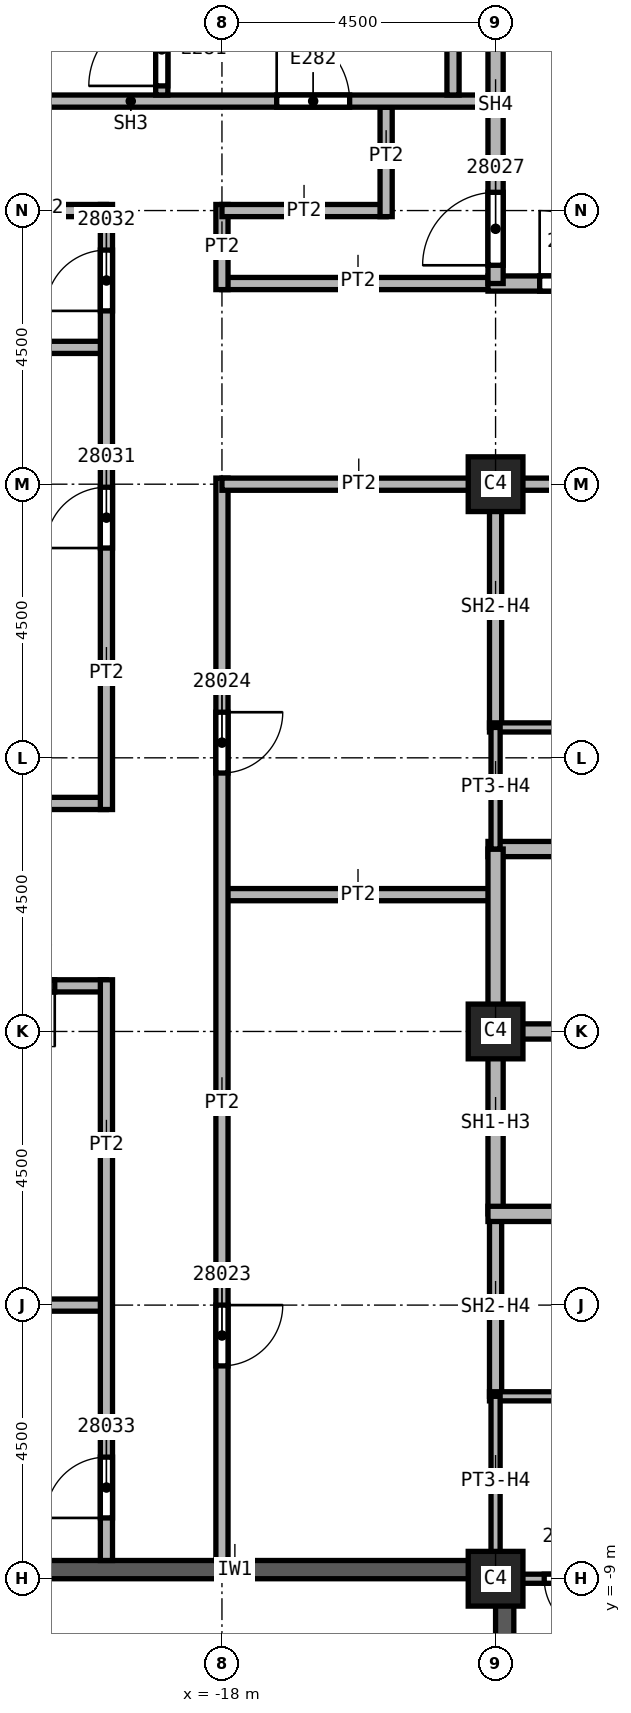
"""IFC4 building model, lengths in metres.
Left out: names, types, materials, properties, quantities, classifications, styles, units other than length and angle.
Written with IfcOpenShell. Run it as: python <this file> out.ifc"""

import sys

from ifc_helpers import new_model, si_unit, direction, frame, frame_2d, origin, origin_2d, place, context, subcontext, project, spatial, rectangle, extrude, element, fill, save


model = new_model("IFC4")
c1 = context("Model", 3, precision=1e-05, world=origin(), true_north=direction((0.0, 1.0)))
c2 = subcontext(c1, "Body", "Model", "MODEL_VIEW")
j1 = project(units=[si_unit("LENGTHUNIT", "METRE"), si_unit("PLANEANGLEUNIT", "RADIAN")], contexts=[c1])
p1 = place(None, origin())
s1 = spatial("IfcSite", under=j1, at=p1, CompositionType="ELEMENT")
p2 = place(p1, origin())
s2 = spatial("IfcBuilding", under=s1, at=p2, CompositionType="ELEMENT")
p3 = place(p2, frame((0.0, 0.0, 236.0)))
s3 = spatial("IfcBuildingStorey", under=s2, at=p3, CompositionType="ELEMENT", Elevation=236.0)
for number, where, z_axis, x_axis in (
    (1, (-13.5, 0.0, 0.0), (0.0, 0.0, 1.0), (1.0, 0.0, 0.0)),
    (2, (-13.5, 9.0, 0.0), (0.0, 0.0, 1.0), (1.0, 0.0, 0.0)),
    (3, (-13.5, -9.0, 0.0), (0.0, 0.0, 1.0), (1.0, 0.0, 0.0)),
):
    element("IfcColumn", number, at=place(p3, frame(where, z_axis=z_axis, x_axis=x_axis)), inside=s3, PredefinedType="COLUMN", context=c2, shape_type="SweptSolid", body=[
        extrude(rectangle(XDim=0.9, YDim=0.9, at=origin_2d()), origin(), (0.0, 0.0, 1.0), 5.72),
    ])
p4 = place(p3, frame((-13.35, -17.5, 0.0), z_axis=(0.0, 0.0, 1.0), x_axis=(0.0, 1.0, 0.0)))
e4 = element("IfcWall", 4, at=p4, inside=s3, PredefinedType="SOLIDWALL", context=c2, shape_type="SweptSolid", body=[
    extrude(rectangle(XDim=8.475, YDim=0.3, at=frame_2d((4.238, 0.0))), origin(), (0.0, 0.0, 1.0), 5.12),
])
p5 = place(p4, frame((3.425, 0.0, 0.0)))
e5 = element("IfcOpeningElement", 5, at=p5, cuts=e4, PredefinedType="OPENING", context=c2, shape_type="SweptSolid", body=[
    extrude(rectangle(XDim=1.2, YDim=2.4, at=frame_2d((0.6, 1.2))), frame((0.0, 0.15, 0.0), z_axis=(0.0, -1.0, 0.0), x_axis=(1.0, 0.0, 0.0)), (0.0, 0.0, 1.0), 0.3),
])
p6 = place(p3, frame((-22.0, -8.85, 0.0), z_axis=(0.0, 0.0, 1.0), x_axis=(1.0, 0.0, 0.0)))
e6 = element("IfcWall", 6, at=p6, inside=s3, PredefinedType="SOLIDWALL", context=c2, shape_type="SweptSolid", body=[
    extrude(rectangle(XDim=8.475, YDim=0.3, at=frame_2d((4.238, 0.0))), origin(), (0.0, 0.0, 1.0), 5.12),
])
p7 = place(p3, frame((-33.85, 3.75, 0.0), z_axis=(0.0, 0.0, 1.0), x_axis=(1.0, 0.0, 0.0)))
e7 = element("IfcWall", 7, at=p7, inside=s3, PredefinedType="PARTITIONING", context=c2, shape_type="SweptSolid", body=[
    extrude(rectangle(XDim=13.95, YDim=0.2, at=frame_2d((6.975, 0.0))), origin(), (0.0, 0.0, 1.0), 5.72),
])
for number, where, z_axis, x_axis in (
    (8, (-27.1, -4.5, 0.0), (0.0, 0.0, 1.0), (1.0, 0.0, 0.0)),
    (9, (-27.1, 11.25, 0.0), (0.0, 0.0, 1.0), (1.0, 0.0, 0.0)),
):
    element("IfcWall", number, at=place(p3, frame(where, z_axis=z_axis, x_axis=x_axis)), inside=s3, PredefinedType="PARTITIONING", context=c2, shape_type="SweptSolid", body=[
        extrude(rectangle(XDim=7.2, YDim=0.2, at=frame_2d((3.6, 0.0))), origin(), (0.0, 0.0, 1.0), 5.72),
    ])
p8 = place(p3, frame((-19.9, 0.75, 0.0), z_axis=(0.0, 0.0, 1.0), x_axis=(-1.0, 0.0, 0.0)))
e10 = element("IfcWall", 10, at=p8, inside=s3, PredefinedType="PARTITIONING", context=c2, shape_type="SweptSolid", body=[
    extrude(rectangle(XDim=13.95, YDim=0.2, at=frame_2d((6.975, 0.0))), origin(), (0.0, 0.0, 1.0), 5.72),
])
p9 = place(p8, frame((0.85, 0.0, 0.0)))
e11 = element("IfcOpeningElement", 11, at=p9, cuts=e10, PredefinedType="OPENING", context=c2, shape_type="SweptSolid", body=[
    extrude(rectangle(XDim=1.0, YDim=2.1, at=frame_2d((0.5, 1.05))), frame((0.0, 0.1, 0.0), z_axis=(0.0, -1.0, 0.0), x_axis=(1.0, 0.0, 0.0)), (0.0, 0.0, 1.0), 0.2),
])
p10 = place(p3, frame((-19.9, -8.7, 0.0), z_axis=(0.0, 0.0, 1.0), x_axis=(0.0, 1.0, 0.0)))
e12 = element("IfcWall", 12, at=p10, inside=s3, PredefinedType="PARTITIONING", context=c2, shape_type="SweptSolid", body=[
    extrude(rectangle(XDim=9.55, YDim=0.2, at=frame_2d((4.775, 0.0))), origin(), (0.0, 0.0, 1.0), 5.72),
])
p11 = place(p10, frame((0.7, 0.0, 0.0)))
e13 = element("IfcOpeningElement", 13, at=p11, cuts=e12, PredefinedType="OPENING", context=c2, shape_type="SweptSolid", body=[
    extrude(rectangle(XDim=1.0, YDim=2.1, at=frame_2d((0.5, 1.05))), frame((0.0, 0.1, 0.0), z_axis=(0.0, -1.0, 0.0), x_axis=(1.0, 0.0, 0.0)), (0.0, 0.0, 1.0), 0.2),
])
p12 = place(p3, frame((-19.9, 3.65, 0.0), z_axis=(0.0, 0.0, 1.0), x_axis=(0.0, 1.0, 0.0)))
e14 = element("IfcWall", 14, at=p12, inside=s3, PredefinedType="PARTITIONING", context=c2, shape_type="SweptSolid", body=[
    extrude(rectangle(XDim=9.95, YDim=0.2, at=frame_2d((4.975, 0.0))), origin(), (0.0, 0.0, 1.0), 5.72),
])
p13 = place(p12, frame((4.3, 0.0, 0.0)))
e15 = element("IfcOpeningElement", 15, at=p13, cuts=e14, PredefinedType="OPENING", context=c2, shape_type="SweptSolid", body=[
    extrude(rectangle(XDim=1.0, YDim=2.1, at=frame_2d((0.5, 1.05))), frame((0.0, 0.1, 0.0), z_axis=(0.0, -1.0, 0.0), x_axis=(1.0, 0.0, 0.0)), (0.0, 0.0, 1.0), 0.2),
])
p14 = place(p12, frame((8.2, 0.0, 0.0)))
e16 = element("IfcOpeningElement", 16, at=p14, cuts=e14, PredefinedType="OPENING", context=c2, shape_type="SweptSolid", body=[
    extrude(rectangle(XDim=1.0, YDim=2.1, at=frame_2d((0.5, 1.05))), frame((0.0, 0.1, 0.0), z_axis=(0.0, -1.0, 0.0), x_axis=(1.0, 0.0, 0.0)), (0.0, 0.0, 1.0), 0.2),
])
p15 = place(p3, frame((-19.9, 13.5, 0.0), z_axis=(0.0, 0.0, 1.0), x_axis=(-1.0, 0.0, 0.0)))
e17 = element("IfcWall", 17, at=p15, inside=s3, PredefinedType="PARTITIONING", context=c2, shape_type="SweptSolid", body=[
    extrude(rectangle(XDim=2.1, YDim=0.2, at=frame_2d((1.05, 0.0))), origin(), (0.0, 0.0, 1.0), 5.72),
])
p16 = place(p3, frame((-18.0, 2.25, 0.0), z_axis=(0.0, 0.0, 1.0), x_axis=(1.0, 0.0, 0.0)))
e18 = element("IfcWall", 18, at=p16, inside=s3, PredefinedType="PARTITIONING", context=c2, shape_type="SweptSolid", body=[
    extrude(rectangle(XDim=4.5, YDim=0.2, at=frame_2d((2.25, 0.0))), origin(), (0.0, 0.0, 1.0), 5.72),
])
p17 = place(p3, frame((-18.0, 9.1, 0.0), z_axis=(0.0, 0.0, 1.0), x_axis=(0.0, -1.0, 0.0)))
e19 = element("IfcWall", 19, at=p17, inside=s3, PredefinedType="PARTITIONING", context=c2, shape_type="SweptSolid", body=[
    extrude(rectangle(XDim=17.8, YDim=0.2, at=frame_2d((8.9, 0.0))), origin(), (0.0, 0.0, 1.0), 5.72),
])
p18 = place(p17, frame((13.6, 0.0, 0.0)))
e20 = element("IfcOpeningElement", 20, at=p18, cuts=e19, PredefinedType="OPENING", context=c2, shape_type="SweptSolid", body=[
    extrude(rectangle(XDim=1.0, YDim=2.1, at=frame_2d((0.5, 1.05))), frame((0.0, 0.1, 0.0), z_axis=(0.0, -1.0, 0.0), x_axis=(1.0, 0.0, 0.0)), (0.0, 0.0, 1.0), 0.2),
])
p19 = place(p17, frame((3.85, 0.0, 0.0)))
e21 = element("IfcOpeningElement", 21, at=p19, cuts=e19, PredefinedType="OPENING", context=c2, shape_type="SweptSolid", body=[
    extrude(rectangle(XDim=1.0, YDim=2.1, at=frame_2d((0.5, 1.05))), frame((0.0, 0.1, 0.0), z_axis=(0.0, -1.0, 0.0), x_axis=(1.0, 0.0, 0.0)), (0.0, 0.0, 1.0), 0.2),
])
p20 = place(p3, frame((-18.0, 12.3, 0.0), z_axis=(0.0, 0.0, 1.0), x_axis=(1.0, 0.0, 0.0)))
e22 = element("IfcWall", 22, at=p20, inside=s3, PredefinedType="PARTITIONING", context=c2, shape_type="SweptSolid", body=[
    extrude(rectangle(XDim=4.625, YDim=0.2, at=frame_2d((2.312, 0.0))), origin(), (0.0, 0.0, 1.0), 5.72),
])
p21 = place(p3, frame((-18.0, 13.6, 0.0), z_axis=(0.0, 0.0, 1.0), x_axis=(0.0, -1.0, 0.0)))
e23 = element("IfcWall", 23, at=p21, inside=s3, PredefinedType="PARTITIONING", context=c2, shape_type="SweptSolid", body=[
    extrude(rectangle(XDim=1.4, YDim=0.2, at=frame_2d((0.7, 0.0))), origin(), (0.0, 0.0, 1.0), 5.72),
])
p22 = place(p3, frame((-15.3, 13.5, 0.0), z_axis=(0.0, 0.0, 1.0), x_axis=(-1.0, 0.0, 0.0)))
e24 = element("IfcWall", 24, at=p22, inside=s3, PredefinedType="PARTITIONING", context=c2, shape_type="SweptSolid", body=[
    extrude(rectangle(XDim=2.7, YDim=0.2, at=frame_2d((1.35, 0.0))), origin(), (0.0, 0.0, 1.0), 5.72),
])
p23 = place(p3, frame((-15.3, 15.2, 0.0), z_axis=(0.0, 0.0, 1.0), x_axis=(0.0, -1.0, 0.0)))
e25 = element("IfcWall", 25, at=p23, inside=s3, PredefinedType="PARTITIONING", context=c2, shape_type="SweptSolid", body=[
    extrude(rectangle(XDim=1.8, YDim=0.2, at=frame_2d((0.9, 0.0))), origin(), (0.0, 0.0, 1.0), 5.72),
])
p24 = place(p3, frame((-13.5, 9.0, 0.0), z_axis=(0.0, 0.0, 1.0), x_axis=(-1.0, 0.0, 0.0)))
e26 = element("IfcWall", 26, at=p24, inside=s3, PredefinedType="PARTITIONING", context=c2, shape_type="SweptSolid", body=[
    extrude(rectangle(XDim=4.5, YDim=0.2, at=frame_2d((2.25, 0.0))), origin(), (0.0, 0.0, 1.0), 5.72),
])
p25 = place(p3, frame((-13.6, 9.0, 0.0), z_axis=(0.0, 0.0, 1.0), x_axis=(1.0, 0.0, 0.0)))
e27 = element("IfcWall", 27, at=p25, inside=s3, PredefinedType="SOLIDWALL", context=c2, shape_type="SweptSolid", body=[
    extrude(rectangle(XDim=3.1, YDim=0.2, at=frame_2d((1.55, 0.0))), origin(), (0.0, 0.0, 1.0), 5.042),
])
p26 = place(p3, frame((-13.5, -6.0, 0.0), z_axis=(0.0, 0.0, 1.0), x_axis=(0.0, 1.0, 0.0)))
e28 = element("IfcWall", 28, at=p26, inside=s3, PredefinedType="SOLIDWALL", context=c2, shape_type="SweptSolid", body=[
    extrude(rectangle(XDim=3.0, YDim=0.2, at=frame_2d((1.5, 0.0))), origin(), (0.0, 0.0, 1.0), 5.042),
])
p27 = place(p3, frame((-13.5, 5.0, 0.0), z_axis=(0.0, 0.0, 1.0), x_axis=(0.0, 1.0, 0.0)))
e29 = element("IfcWall", 29, at=p27, inside=s3, PredefinedType="SOLIDWALL", context=c2, shape_type="SweptSolid", body=[
    extrude(rectangle(XDim=4.1, YDim=0.2, at=frame_2d((2.05, 0.0))), origin(), (0.0, 0.0, 1.0), 5.042),
])
p28 = place(p3, frame((-13.625, 0.0, 0.0), z_axis=(0.0, 0.0, 1.0), x_axis=(1.0, 0.0, 0.0)))
e30 = element("IfcWall", 30, at=p28, inside=s3, PredefinedType="SOLIDWALL", context=c2, shape_type="SweptSolid", body=[
    extrude(rectangle(XDim=3.125, YDim=0.25, at=frame_2d((1.562, 0.0))), origin(), (0.0, 0.0, 1.0), 5.72),
])
p29 = place(p3, frame((-13.625, 3.0, 0.0), z_axis=(0.0, 0.0, 1.0), x_axis=(1.0, 0.0, 0.0)))
e31 = element("IfcWall", 31, at=p29, inside=s3, PredefinedType="SOLIDWALL", context=c2, shape_type="SweptSolid", body=[
    extrude(rectangle(XDim=9.25, YDim=0.25, at=frame_2d((4.625, 0.0))), origin(), (0.0, 0.0, 1.0), 5.72),
])
p30 = place(p29, frame((3.25, 0.0, 0.0)))
e32 = element("IfcOpeningElement", 32, at=p30, cuts=e31, PredefinedType="OPENING", context=c2, shape_type="SweptSolid", body=[
    extrude(rectangle(XDim=1.1, YDim=2.1, at=frame_2d((0.55, 1.05))), frame((0.0, 0.125, 0.0), z_axis=(0.0, -1.0, 0.0), x_axis=(1.0, 0.0, 0.0)), (0.0, 0.0, 1.0), 0.25),
])
p31 = place(p3, frame((-13.5, -3.0, 0.0), z_axis=(0.0, 0.0, 1.0), x_axis=(0.0, 1.0, 0.0)))
e33 = element("IfcWall", 33, at=p31, inside=s3, PredefinedType="SOLIDWALL", context=c2, shape_type="SweptSolid", body=[
    extrude(rectangle(XDim=6.0, YDim=0.25, at=frame_2d((3.0, 0.0))), origin(), (0.0, 0.0, 1.0), 5.042),
])
p32 = place(p3, frame((-13.625, -3.0, 0.0), z_axis=(0.0, 0.0, 1.0), x_axis=(1.0, 0.0, 0.0)))
e34 = element("IfcWall", 34, at=p32, inside=s3, PredefinedType="SOLIDWALL", context=c2, shape_type="SweptSolid", body=[
    extrude(rectangle(XDim=6.125, YDim=0.25, at=frame_2d((3.062, 0.0))), origin(), (0.0, 0.0, 1.0), 5.72),
])
p33 = place(p32, frame((3.25, 0.0, 0.0)))
e35 = element("IfcOpeningElement", 35, at=p33, cuts=e34, PredefinedType="OPENING", context=c2, shape_type="SweptSolid", body=[
    extrude(rectangle(XDim=1.1, YDim=2.1, at=frame_2d((0.55, 1.05))), frame((0.0, 0.125, 0.0), z_axis=(0.0, -1.0, 0.0), x_axis=(1.0, 0.0, 0.0)), (0.0, 0.0, 1.0), 0.25),
])
p34 = place(p3, frame((-13.625, 12.3, 0.0), z_axis=(0.0, 0.0, 1.0), x_axis=(1.0, 0.0, 0.0)))
e36 = element("IfcWall", 36, at=p34, inside=s3, PredefinedType="SOLIDWALL", context=c2, shape_type="SweptSolid", body=[
    extrude(rectangle(XDim=9.25, YDim=0.25, at=frame_2d((4.625, 0.0))), origin(), (0.0, 0.0, 1.0), 5.72),
])
p35 = place(p34, frame((0.85, 0.0, 0.0)))
e37 = element("IfcOpeningElement", 37, at=p35, cuts=e36, PredefinedType="OPENING", context=c2, shape_type="SweptSolid", body=[
    extrude(rectangle(XDim=1.2, YDim=2.1, at=frame_2d((0.6, 1.05))), frame((0.0, 0.125, 0.0), z_axis=(0.0, -1.0, 0.0), x_axis=(1.0, 0.0, 0.0)), (0.0, 0.0, 1.0), 0.25),
])
p36 = place(p3, frame((-13.5, 12.3, 0.0), z_axis=(0.0, 0.0, 1.0), x_axis=(0.0, 1.0, 0.0)))
e38 = element("IfcWall", 38, at=p36, inside=s3, PredefinedType="SOLIDWALL", context=c2, shape_type="SweptSolid", body=[
    extrude(rectangle(XDim=4.5, YDim=0.25, at=frame_2d((2.25, 0.0))), origin(), (0.0, 0.0, 1.0), 5.72),
])
p37 = place(p36, frame((0.3, 0.0, 0.0)))
e39 = element("IfcOpeningElement", 39, at=p37, cuts=e38, PredefinedType="OPENING", context=c2, shape_type="SweptSolid", body=[
    extrude(rectangle(XDim=1.2, YDim=2.1, at=frame_2d((0.6, 1.05))), frame((0.0, 0.125, 0.0), z_axis=(0.0, -1.0, 0.0), x_axis=(1.0, 0.0, 0.0)), (0.0, 0.0, 1.0), 0.25),
])
for number, where, z_axis, x_axis in (
    (40, (-13.6, -6.0, 0.0), (0.0, 0.0, 1.0), (1.0, 0.0, 0.0)),
    (41, (-13.6, 5.0, 0.0), (0.0, 0.0, 1.0), (1.0, 0.0, 0.0)),
):
    element("IfcWall", number, at=place(p3, frame(where, z_axis=z_axis, x_axis=x_axis)), inside=s3, PredefinedType="PARTITIONING", context=c2, shape_type="SweptSolid", body=[
        extrude(rectangle(XDim=3.1, YDim=0.15, at=frame_2d((1.55, 0.0))), origin(), (0.0, 0.0, 1.0), 5.72),
    ])
p38 = place(p3, frame((-13.5, -9.0, 0.0), z_axis=(0.0, 0.0, 1.0), x_axis=(0.0, 1.0, 0.0)))
e42 = element("IfcWall", 42, at=p38, inside=s3, PredefinedType="PARTITIONING", context=c2, shape_type="SweptSolid", body=[
    extrude(rectangle(XDim=3.0, YDim=0.15, at=frame_2d((1.5, 0.0))), origin(), (0.0, 0.0, 1.0), 5.042),
])
p39 = place(p3, frame((-13.5, 3.0, 0.0), z_axis=(0.0, 0.0, 1.0), x_axis=(0.0, 1.0, 0.0)))
e43 = element("IfcWall", 43, at=p39, inside=s3, PredefinedType="PARTITIONING", context=c2, shape_type="SweptSolid", body=[
    extrude(rectangle(XDim=2.0, YDim=0.15, at=frame_2d((1.0, 0.0))), origin(), (0.0, 0.0, 1.0), 5.042),
])
p40 = place(p3, frame((-10.5, -9.0, 0.0), z_axis=(0.0, 0.0, 1.0), x_axis=(-1.0, 0.0, 0.0)))
e44 = element("IfcWall", 44, at=p40, inside=s3, PredefinedType="PARTITIONING", context=c2, shape_type="SweptSolid", body=[
    extrude(rectangle(XDim=3.025, YDim=0.15, at=frame_2d((1.512, 0.0))), origin(), (0.0, 0.0, 1.0), 5.042),
])
p41 = place(p40, frame((1.3, 0.0, 0.0)))
e45 = element("IfcOpeningElement", 45, at=p41, cuts=e44, PredefinedType="OPENING", context=c2, shape_type="SweptSolid", body=[
    extrude(rectangle(XDim=0.9, YDim=2.1, at=frame_2d((0.45, 1.05))), frame((0.0, 0.075, 0.0), z_axis=(0.0, -1.0, 0.0), x_axis=(1.0, 0.0, 0.0)), (0.0, 0.0, 1.0), 0.15),
])
p42 = place(p3, frame((-21.9, 15.3, 0.0), z_axis=(0.0, 0.0, 1.0), x_axis=(1.0, 0.0, 0.0)))
e46 = element("IfcWall", 46, at=p42, inside=s3, PredefinedType="SOLIDWALL", context=c2, shape_type="SweptSolid", body=[
    extrude(rectangle(XDim=8.275, YDim=0.2, at=frame_2d((4.137, 0.0))), origin(), (0.0, 0.0, 1.0), 5.72),
])
p43 = place(p42, frame((4.8, 0.0, 0.0)))
e47 = element("IfcOpeningElement", 47, at=p43, cuts=e46, PredefinedType="OPENING", context=c2, shape_type="SweptSolid", body=[
    extrude(rectangle(XDim=1.2, YDim=2.1, at=frame_2d((0.6, 1.05))), frame((0.0, 0.1, 0.0), z_axis=(0.0, -1.0, 0.0), x_axis=(1.0, 0.0, 0.0)), (0.0, 0.0, 1.0), 0.2),
])
p44 = place(p3, frame((-14.2, 15.4, 0.0), z_axis=(0.0, 0.0, 1.0), x_axis=(0.0, 1.0, 0.0)))
e48 = element("IfcWall", 48, at=p44, inside=s3, PredefinedType="SOLIDWALL", context=c2, shape_type="SweptSolid", body=[
    extrude(rectangle(XDim=5.9, YDim=0.2, at=frame_2d((2.95, 0.0))), origin(), (0.0, 0.0, 1.0), 5.72),
])
p45 = place(p3, frame((-18.99, 15.4, 0.0), z_axis=(0.0, 0.0, 1.0), x_axis=(0.0, 1.0, 0.0)))
e49 = element("IfcWall", 49, at=p45, inside=s3, PredefinedType="SOLIDWALL", context=c2, shape_type="SweptSolid", body=[
    extrude(rectangle(XDim=5.9, YDim=0.2, at=frame_2d((2.95, 0.0))), origin(), (0.0, 0.0, 1.0), 5.72),
])
p46 = place(p45, frame((0.15, 0.0, 0.0)))
e50 = element("IfcOpeningElement", 50, at=p46, cuts=e49, PredefinedType="OPENING", context=c2, shape_type="SweptSolid", body=[
    extrude(rectangle(XDim=1.2, YDim=2.1, at=frame_2d((0.6, 1.05))), frame((0.0, 0.1, 0.0), z_axis=(0.0, -1.0, 0.0), x_axis=(1.0, 0.0, 0.0)), (0.0, 0.0, 1.0), 0.2),
])
p47 = place(p41, origin())
e51 = element("IfcDoor", 51, at=p47, inside=s3, OperationType="SINGLE_SWING_LEFT", PredefinedType="DOOR", context=c2, shape_type="SweptSolid", body=[
    extrude(rectangle(XDim=0.9, YDim=2.1, at=frame_2d((0.45, 1.05))), frame((0.0, 0.025, 0.0), z_axis=(0.0, -1.0, 0.0), x_axis=(1.0, 0.0, 0.0)), (0.0, 0.0, 1.0), 0.05),
])
fill(e45, e51)
p48 = place(p35, origin())
e52 = element("IfcDoor", 52, at=p48, inside=s3, OperationType="SINGLE_SWING_RIGHT", PredefinedType="DOOR", context=c2, shape_type="SweptSolid", body=[
    extrude(rectangle(XDim=1.2, YDim=2.1, at=frame_2d((0.6, 1.05))), frame((0.0, 0.025, 0.0), z_axis=(0.0, -1.0, 0.0), x_axis=(1.0, 0.0, 0.0)), (0.0, 0.0, 1.0), 0.05),
])
fill(e37, e52)
p49 = place(p18, origin())
e53 = element("IfcDoor", 53, at=p49, inside=s3, OperationType="SINGLE_SWING_RIGHT", PredefinedType="DOOR", context=c2, shape_type="SweptSolid", body=[
    extrude(rectangle(XDim=1.0, YDim=2.1, at=frame_2d((0.5, 1.05))), frame((0.0, 0.025, 0.0), z_axis=(0.0, -1.0, 0.0), x_axis=(1.0, 0.0, 0.0)), (0.0, 0.0, 1.0), 0.05),
])
fill(e20, e53)
p50 = place(p19, origin())
e54 = element("IfcDoor", 54, at=p50, inside=s3, OperationType="SINGLE_SWING_LEFT", PredefinedType="DOOR", context=c2, shape_type="SweptSolid", body=[
    extrude(rectangle(XDim=1.0, YDim=2.1, at=frame_2d((0.5, 1.05))), frame((0.0, 0.025, 0.0), z_axis=(0.0, -1.0, 0.0), x_axis=(1.0, 0.0, 0.0)), (0.0, 0.0, 1.0), 0.05),
])
fill(e21, e54)
p51 = place(p37, origin())
e55 = element("IfcDoor", 55, at=p51, inside=s3, OperationType="SINGLE_SWING_RIGHT", PredefinedType="DOOR", context=c2, shape_type="SweptSolid", body=[
    extrude(rectangle(XDim=1.2, YDim=2.1, at=frame_2d((0.6, 1.05))), frame((0.0, 0.025, 0.0), z_axis=(0.0, -1.0, 0.0), x_axis=(1.0, 0.0, 0.0)), (0.0, 0.0, 1.0), 0.05),
])
fill(e39, e55)
p52 = place(p13, origin())
e56 = element("IfcDoor", 56, at=p52, inside=s3, OperationType="SINGLE_SWING_RIGHT", PredefinedType="DOOR", context=c2, shape_type="SweptSolid", body=[
    extrude(rectangle(XDim=1.0, YDim=2.1, at=frame_2d((0.5, 1.05))), frame((0.0, 0.025, 0.0), z_axis=(0.0, -1.0, 0.0), x_axis=(1.0, 0.0, 0.0)), (0.0, 0.0, 1.0), 0.05),
])
fill(e15, e56)
p53 = place(p14, origin())
e57 = element("IfcDoor", 57, at=p53, inside=s3, OperationType="SINGLE_SWING_LEFT", PredefinedType="DOOR", context=c2, shape_type="SweptSolid", body=[
    extrude(rectangle(XDim=1.0, YDim=2.1, at=frame_2d((0.5, 1.05))), frame((0.0, 0.025, 0.0), z_axis=(0.0, -1.0, 0.0), x_axis=(1.0, 0.0, 0.0)), (0.0, 0.0, 1.0), 0.05),
])
fill(e16, e57)
p54 = place(p11, origin())
e58 = element("IfcDoor", 58, at=p54, inside=s3, OperationType="SINGLE_SWING_RIGHT", PredefinedType="DOOR", context=c2, shape_type="SweptSolid", body=[
    extrude(rectangle(XDim=1.0, YDim=2.1, at=frame_2d((0.5, 1.05))), frame((0.0, 0.025, 0.0), z_axis=(0.0, -1.0, 0.0), x_axis=(1.0, 0.0, 0.0)), (0.0, 0.0, 1.0), 0.05),
])
fill(e13, e58)
p55 = place(p9, origin())
e59 = element("IfcDoor", 59, at=p55, inside=s3, OperationType="SINGLE_SWING_LEFT", PredefinedType="DOOR", context=c2, shape_type="SweptSolid", body=[
    extrude(rectangle(XDim=1.0, YDim=2.1, at=frame_2d((0.5, 1.05))), frame((0.0, 0.025, 0.0), z_axis=(0.0, -1.0, 0.0), x_axis=(1.0, 0.0, 0.0)), (0.0, 0.0, 1.0), 0.05),
])
fill(e11, e59)
p56 = place(p46, origin())
e60 = element("IfcDoor", 60, at=p56, inside=s3, OperationType="SINGLE_SWING_LEFT", PredefinedType="DOOR", context=c2, shape_type="SweptSolid", body=[
    extrude(rectangle(XDim=1.2, YDim=2.1, at=frame_2d((0.6, 1.05))), frame((0.0, 0.025, 0.0), z_axis=(0.0, -1.0, 0.0), x_axis=(1.0, 0.0, 0.0)), (0.0, 0.0, 1.0), 0.05),
])
fill(e50, e60)
p57 = place(p43, origin())
e61 = element("IfcDoor", 61, at=p57, inside=s3, OperationType="SINGLE_SWING_RIGHT", PredefinedType="DOOR", context=c2, shape_type="SweptSolid", body=[
    extrude(rectangle(XDim=1.2, YDim=2.1, at=frame_2d((0.6, 1.05))), frame((0.0, 0.025, 0.0), z_axis=(0.0, -1.0, 0.0), x_axis=(1.0, 0.0, 0.0)), (0.0, 0.0, 1.0), 0.05),
])
fill(e47, e61)
save(model, sys.argv[1])
